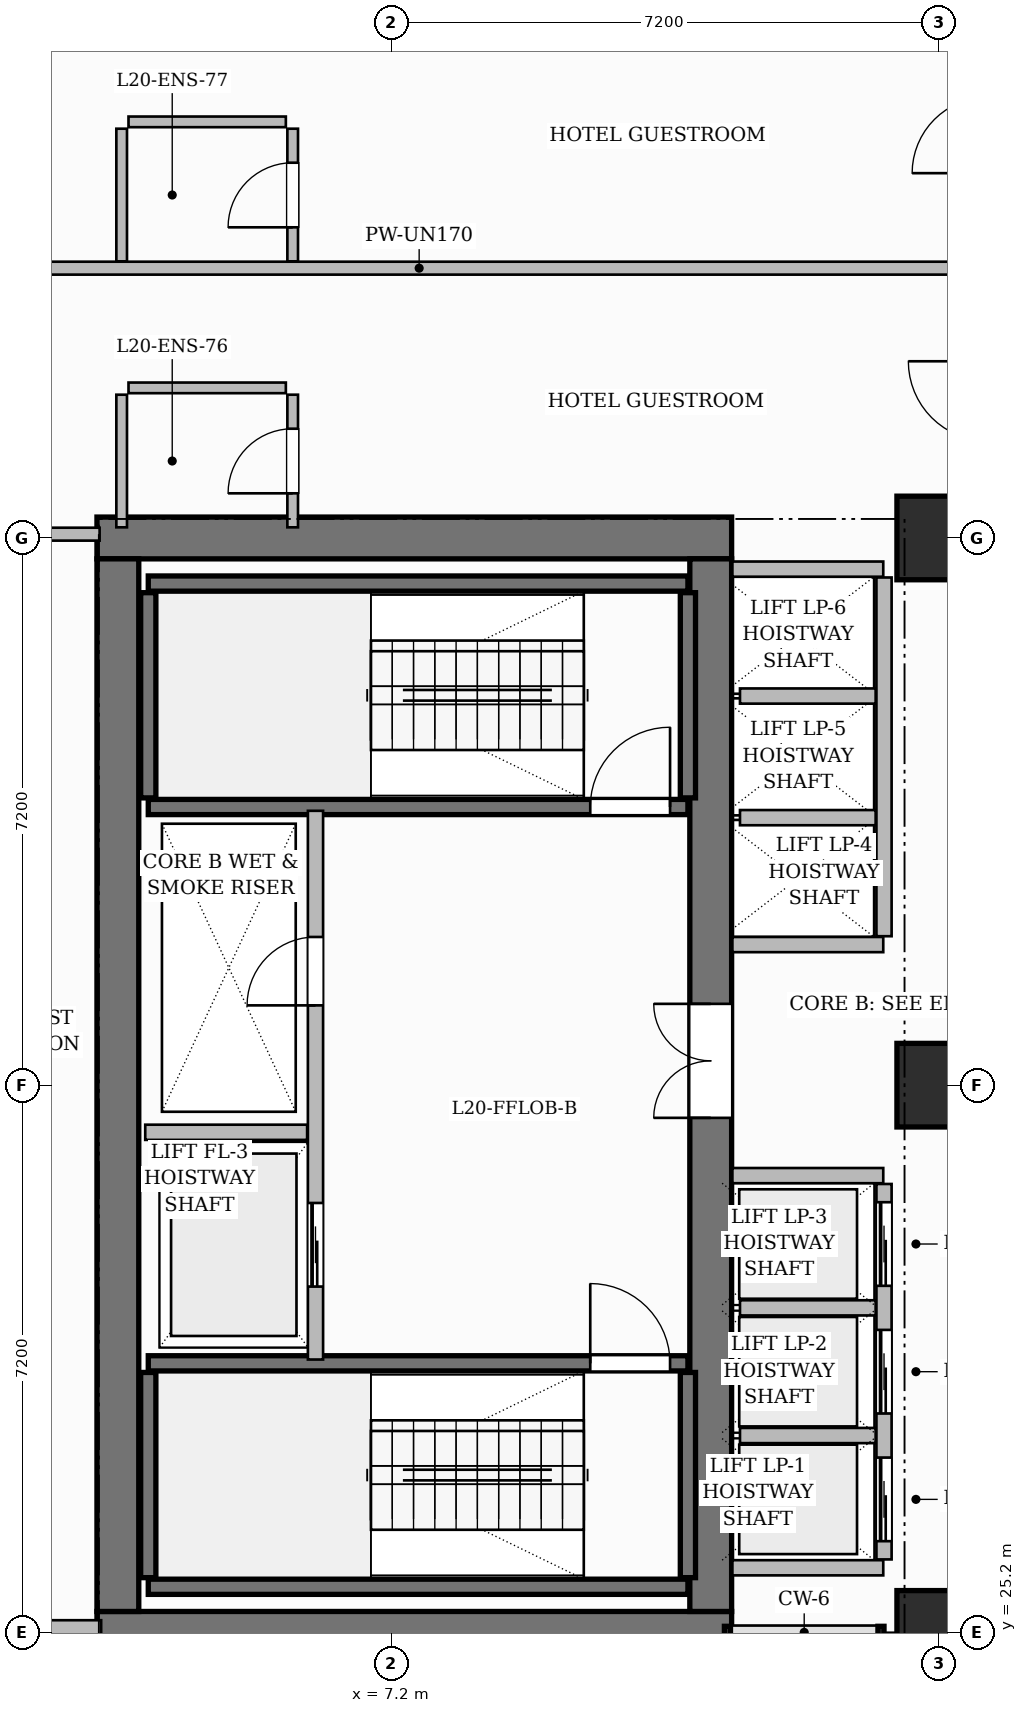
"""IFC4 building model, lengths in metres.
Left out: names, types, materials, properties, quantities, classifications, styles, units other than length and angle.
Written with IfcOpenShell. Run it as: python <this file> out.ifc"""

import sys

from ifc_helpers import new_model, si_unit, direction, frame, frame_2d, origin, origin_2d, place, context, subcontext, project, spatial, rectangle, extrude, source, transform, mapped, element, fill, save


model = new_model("IFC4")
c1 = context("Model", 3, precision=1e-05, world=origin(), true_north=direction((0.0, 1.0)))
c2 = subcontext(c1, "Body", "Model", "MODEL_VIEW")
j1 = project(units=[si_unit("LENGTHUNIT", "METRE"), si_unit("PLANEANGLEUNIT", "RADIAN")], contexts=[c1])
p1 = place(None, origin())
s1 = spatial("IfcSite", under=j1, at=p1, CompositionType="ELEMENT")
p2 = place(p1, origin())
s2 = spatial("IfcBuilding", under=s1, at=p2, CompositionType="ELEMENT")
p3 = place(p2, frame((0.0, 0.0, 84.2)))
s3 = spatial("IfcBuildingStorey", under=s2, at=p3, CompositionType="ELEMENT", Elevation=84.2)
for number, where, z_axis, x_axis in (
    (1, (3.325, 25.2, 0.0), (0.0, 0.0, 1.0), (1.0, 0.0, 0.0)),
    (2, (3.325, 39.6, 0.0), (0.0, 0.0, 1.0), (1.0, 0.0, 0.0)),
):
    element("IfcWall", number, at=place(p3, frame(where, z_axis=z_axis, x_axis=x_axis)), inside=s3, PredefinedType="SHEAR", context=c2, shape_type="SweptSolid", body=[
        extrude(rectangle(XDim=8.35, YDim=0.55, at=frame_2d((4.175, 0.0))), origin(), (0.0, 0.0, 1.0), 3.7),
    ])
p4 = place(p3, frame((3.6, 25.475, 0.0), z_axis=(0.0, 0.0, 1.0), x_axis=(0.0, 1.0, 0.0)))
e3 = element("IfcWall", 3, at=p4, inside=s3, PredefinedType="SHEAR", context=c2, shape_type="SweptSolid", body=[
    extrude(rectangle(XDim=13.85, YDim=0.55, at=frame_2d((6.925, 0.0))), origin(), (0.0, 0.0, 1.0), 3.7),
])
p5 = place(p3, frame((11.4, 25.475, 0.0), z_axis=(0.0, 0.0, 1.0), x_axis=(0.0, 1.0, 0.0)))
e4 = element("IfcWall", 4, at=p5, inside=s3, PredefinedType="SHEAR", context=c2, shape_type="SweptSolid", body=[
    extrude(rectangle(XDim=13.85, YDim=0.55, at=frame_2d((6.925, 0.0))), origin(), (0.0, 0.0, 1.0), 3.7),
])
p6 = place(p5, frame((6.495, 0.0, 0.0)))
e5 = element("IfcOpeningElement", 5, at=p6, cuts=e4, PredefinedType="OPENING", context=c2, shape_type="SweptSolid", body=[
    extrude(rectangle(XDim=1.5, YDim=2.2, at=frame_2d((0.75, 1.1))), frame((0.0, 0.285, 0.0), z_axis=(0.0, -1.0, 0.0), x_axis=(1.0, 0.0, 0.0)), (0.0, 0.0, 1.0), 0.57),
])
m1 = source(origin(), c2, "Body", "SweptSolid", [
    extrude(rectangle(XDim=1.1, YDim=1.1, at=origin_2d()), origin(), (0.0, 0.0, 1.0), 3.7),
])
for number, where, z_axis, x_axis in (
    (6, (14.4, 25.2, 0.0), (0.0, 0.0, 1.0), (1.0, 0.0, 0.0)),
    (7, (14.4, 32.4, 0.0), (0.0, 0.0, 1.0), (1.0, 0.0, 0.0)),
    (8, (14.4, 39.6, 0.0), (0.0, 0.0, 1.0), (1.0, 0.0, 0.0)),
):
    element("IfcColumn", number, at=place(p3, frame(where, z_axis=z_axis, x_axis=x_axis)), inside=s3, PredefinedType="COLUMN", context=c2, shape_type="MappedRepresentation", body=[
        mapped(m1, transform((0.0, 0.0, 0.0), scale=1.0)),
    ])
p7 = place(p3, frame((4.0, 25.8, 0.0), z_axis=(0.0, 0.0, 1.0), x_axis=(1.0, 0.0, 0.0)))
e9 = element("IfcWall", 9, at=p7, inside=s3, PredefinedType="SHEAR", context=c2, shape_type="SweptSolid", body=[
    extrude(rectangle(XDim=7.1, YDim=0.2, at=frame_2d((3.55, 0.0))), origin(), (0.0, 0.0, 1.0), 3.7),
])
for number, where, z_axis, x_axis in (
    (10, (4.0, 25.92, 0.0), (0.0, 0.0, 1.0), (0.0, 1.0, 0.0)),
    (11, (11.1, 25.92, 0.0), (0.0, 0.0, 1.0), (0.0, 1.0, 0.0)),
):
    element("IfcWall", number, at=place(p3, frame(where, z_axis=z_axis, x_axis=x_axis)), inside=s3, PredefinedType="SHEAR", context=c2, shape_type="SweptSolid", body=[
        extrude(rectangle(XDim=2.7, YDim=0.2, at=frame_2d((1.35, 0.0))), origin(), (0.0, 0.0, 1.0), 3.7),
    ])
p8 = place(p3, frame((4.0, 28.74, 0.0), z_axis=(0.0, 0.0, 1.0), x_axis=(1.0, 0.0, 0.0)))
e12 = element("IfcWall", 12, at=p8, inside=s3, PredefinedType="SHEAR", context=c2, shape_type="SweptSolid", body=[
    extrude(rectangle(XDim=7.1, YDim=0.2, at=frame_2d((3.55, 0.0))), origin(), (0.0, 0.0, 1.0), 3.7),
])
p9 = place(p8, frame((5.815, 0.0, 0.0)))
e13 = element("IfcOpeningElement", 13, at=p9, cuts=e12, PredefinedType="OPENING", context=c2, shape_type="SweptSolid", body=[
    extrude(rectangle(XDim=1.05, YDim=2.2, at=frame_2d((0.525, 1.1))), frame((0.0, 0.11, 0.0), z_axis=(0.0, -1.0, 0.0), x_axis=(1.0, 0.0, 0.0)), (0.0, 0.0, 1.0), 0.22),
])
p10 = place(p3, frame((4.0, 39.0, 0.0), z_axis=(0.0, 0.0, 1.0), x_axis=(1.0, 0.0, 0.0)))
e14 = element("IfcWall", 14, at=p10, inside=s3, PredefinedType="SHEAR", context=c2, shape_type="SweptSolid", body=[
    extrude(rectangle(XDim=7.1, YDim=0.2, at=frame_2d((3.55, 0.0))), origin(), (0.0, 0.0, 1.0), 3.7),
])
for number, where, z_axis, x_axis in (
    (15, (4.0, 36.18, 0.0), (0.0, 0.0, 1.0), (0.0, 1.0, 0.0)),
    (16, (11.1, 36.18, 0.0), (0.0, 0.0, 1.0), (0.0, 1.0, 0.0)),
):
    element("IfcWall", number, at=place(p3, frame(where, z_axis=z_axis, x_axis=x_axis)), inside=s3, PredefinedType="SHEAR", context=c2, shape_type="SweptSolid", body=[
        extrude(rectangle(XDim=2.7, YDim=0.2, at=frame_2d((1.35, 0.0))), origin(), (0.0, 0.0, 1.0), 3.7),
    ])
p11 = place(p3, frame((4.0, 36.06, 0.0), z_axis=(0.0, 0.0, 1.0), x_axis=(1.0, 0.0, 0.0)))
e17 = element("IfcWall", 17, at=p11, inside=s3, PredefinedType="SHEAR", context=c2, shape_type="SweptSolid", body=[
    extrude(rectangle(XDim=7.1, YDim=0.2, at=frame_2d((3.55, 0.0))), origin(), (0.0, 0.0, 1.0), 3.7),
])
p12 = place(p11, frame((5.815, 0.0, 0.0)))
e18 = element("IfcOpeningElement", 18, at=p12, cuts=e17, PredefinedType="OPENING", context=c2, shape_type="SweptSolid", body=[
    extrude(rectangle(XDim=1.05, YDim=2.2, at=frame_2d((0.525, 1.1))), frame((0.0, 0.11, 0.0), z_axis=(0.0, -1.0, 0.0), x_axis=(1.0, 0.0, 0.0)), (0.0, 0.0, 1.0), 0.22),
])
p13 = place(p3, frame((6.2, 28.79, 0.0), z_axis=(0.0, 0.0, 1.0), x_axis=(0.0, 1.0, 0.0)))
e19 = element("IfcWall", 19, at=p13, inside=s3, PredefinedType="PARTITIONING", context=c2, shape_type="SweptSolid", body=[
    extrude(rectangle(XDim=7.22, YDim=0.2, at=frame_2d((3.61, 0.0))), origin(), (0.0, 0.0, 1.0), 3.45),
])
p14 = place(p13, frame((4.66, 0.0, 0.0)))
e20 = element("IfcOpeningElement", 20, at=p14, cuts=e19, PredefinedType="OPENING", context=c2, shape_type="SweptSolid", body=[
    extrude(rectangle(XDim=0.9, YDim=2.1, at=frame_2d((0.45, 1.05))), frame((0.0, 0.11, 0.0), z_axis=(0.0, -1.0, 0.0), x_axis=(1.0, 0.0, 0.0)), (0.0, 0.0, 1.0), 0.22),
])
p15 = place(p13, frame((0.96, 0.0, 0.0)))
e21 = element("IfcOpeningElement", 21, at=p15, cuts=e19, PredefinedType="OPENING", context=c2, shape_type="SweptSolid", body=[
    extrude(rectangle(XDim=1.1, YDim=2.2, at=frame_2d((0.55, 1.1))), frame((0.0, 0.11, 0.0), z_axis=(0.0, -1.0, 0.0), x_axis=(1.0, 0.0, 0.0)), (0.0, 0.0, 1.0), 0.22),
])
p16 = place(p3, frame((3.96, 31.78, 0.0), z_axis=(0.0, 0.0, 1.0), x_axis=(1.0, 0.0, 0.0)))
e22 = element("IfcWall", 22, at=p16, inside=s3, PredefinedType="PARTITIONING", context=c2, shape_type="SweptSolid", body=[
    extrude(rectangle(XDim=2.13, YDim=0.2, at=frame_2d((1.065, 0.0))), origin(), (0.0, 0.0, 1.0), 3.45),
])
for number, where, z_axis, x_axis in (
    (23, (11.685, 26.05, 0.0), (0.0, 0.0, 1.0), (1.0, 0.0, 0.0)),
    (24, (11.685, 31.21, 0.0), (0.0, 0.0, 1.0), (1.0, 0.0, 0.0)),
):
    element("IfcWall", number, at=place(p3, frame(where, z_axis=z_axis, x_axis=x_axis)), inside=s3, PredefinedType="PARTITIONING", context=c2, shape_type="SweptSolid", body=[
        extrude(rectangle(XDim=1.985, YDim=0.2, at=frame_2d((0.992, 0.0))), origin(), (0.0, 0.0, 1.0), 3.45),
    ])
p17 = place(p3, frame((13.68, 26.16, 0.0), z_axis=(0.0, 0.0, 1.0), x_axis=(0.0, 1.0, 0.0)))
e25 = element("IfcWall", 25, at=p17, inside=s3, PredefinedType="PARTITIONING", context=c2, shape_type="SweptSolid", body=[
    extrude(rectangle(XDim=4.94, YDim=0.2, at=frame_2d((2.47, 0.0))), origin(), (0.0, 0.0, 1.0), 3.45),
])
p18 = place(p17, frame((0.24, 0.0, 0.0)))
e26 = element("IfcOpeningElement", 26, at=p18, cuts=e25, PredefinedType="OPENING", context=c2, shape_type="SweptSolid", body=[
    extrude(rectangle(XDim=1.1, YDim=2.2, at=frame_2d((0.55, 1.1))), frame((0.0, 0.11, 0.0), z_axis=(0.0, -1.0, 0.0), x_axis=(1.0, 0.0, 0.0)), (0.0, 0.0, 1.0), 0.22),
])
p19 = place(p17, frame((1.92, 0.0, 0.0)))
e27 = element("IfcOpeningElement", 27, at=p19, cuts=e25, PredefinedType="OPENING", context=c2, shape_type="SweptSolid", body=[
    extrude(rectangle(XDim=1.1, YDim=2.2, at=frame_2d((0.55, 1.1))), frame((0.0, 0.11, 0.0), z_axis=(0.0, -1.0, 0.0), x_axis=(1.0, 0.0, 0.0)), (0.0, 0.0, 1.0), 0.22),
])
p20 = place(p17, frame((3.6, 0.0, 0.0)))
e28 = element("IfcOpeningElement", 28, at=p20, cuts=e25, PredefinedType="OPENING", context=c2, shape_type="SweptSolid", body=[
    extrude(rectangle(XDim=1.1, YDim=2.2, at=frame_2d((0.55, 1.1))), frame((0.0, 0.11, 0.0), z_axis=(0.0, -1.0, 0.0), x_axis=(1.0, 0.0, 0.0)), (0.0, 0.0, 1.0), 0.22),
])
for number, where, z_axis, x_axis in (
    (29, (11.785, 27.79, 0.0), (0.0, 0.0, 1.0), (1.0, 0.0, 0.0)),
    (30, (11.785, 29.47, 0.0), (0.0, 0.0, 1.0), (1.0, 0.0, 0.0)),
):
    element("IfcWall", number, at=place(p3, frame(where, z_axis=z_axis, x_axis=x_axis)), inside=s3, PredefinedType="PARTITIONING", context=c2, shape_type="SweptSolid", body=[
        extrude(rectangle(XDim=1.785, YDim=0.2, at=frame_2d((0.893, 0.0))), origin(), (0.0, 0.0, 1.0), 3.45),
    ])
for number, where, z_axis, x_axis in (
    (31, (11.685, 34.25, 0.0), (0.0, 0.0, 1.0), (1.0, 0.0, 0.0)),
    (32, (11.685, 39.19, 0.0), (0.0, 0.0, 1.0), (1.0, 0.0, 0.0)),
):
    element("IfcWall", number, at=place(p3, frame(where, z_axis=z_axis, x_axis=x_axis)), inside=s3, PredefinedType="PARTITIONING", context=c2, shape_type="SweptSolid", body=[
        extrude(rectangle(XDim=1.985, YDim=0.2, at=frame_2d((0.992, 0.0))), origin(), (0.0, 0.0, 1.0), 3.45),
    ])
p21 = place(p3, frame((13.68, 34.36, 0.0), z_axis=(0.0, 0.0, 1.0), x_axis=(0.0, 1.0, 0.0)))
e33 = element("IfcWall", 33, at=p21, inside=s3, PredefinedType="PARTITIONING", context=c2, shape_type="SweptSolid", body=[
    extrude(rectangle(XDim=4.72, YDim=0.2, at=frame_2d((2.36, 0.0))), origin(), (0.0, 0.0, 1.0), 3.45),
])
for number, where, z_axis, x_axis in (
    (34, (11.785, 35.92, 0.0), (0.0, 0.0, 1.0), (1.0, 0.0, 0.0)),
    (35, (11.785, 37.52, 0.0), (0.0, 0.0, 1.0), (1.0, 0.0, 0.0)),
):
    element("IfcWall", number, at=place(p3, frame(where, z_axis=z_axis, x_axis=x_axis)), inside=s3, PredefinedType="PARTITIONING", context=c2, shape_type="SweptSolid", body=[
        extrude(rectangle(XDim=1.785, YDim=0.2, at=frame_2d((0.893, 0.0))), origin(), (0.0, 0.0, 1.0), 3.45),
    ])
p22 = place(p3, frame((0.24, 39.65, 0.0), z_axis=(0.0, 0.0, 1.0), x_axis=(1.0, 0.0, 0.0)))
e36 = element("IfcWall", 36, at=p22, inside=s3, PredefinedType="PARTITIONING", context=c2, shape_type="SweptSolid", body=[
    extrude(rectangle(XDim=3.12, YDim=0.17, at=frame_2d((1.56, 0.0))), origin(), (0.0, 0.0, 1.0), 3.45),
])
p23 = place(p22, frame((1.11, 0.0, 0.0)))
e37 = element("IfcOpeningElement", 37, at=p23, cuts=e36, PredefinedType="OPENING", context=c2, shape_type="SweptSolid", body=[
    extrude(rectangle(XDim=0.9, YDim=2.15, at=frame_2d((0.45, 1.075))), frame((0.0, 0.095, 0.0), z_axis=(0.0, -1.0, 0.0), x_axis=(1.0, 0.0, 0.0)), (0.0, 0.0, 1.0), 0.19),
])
p24 = place(p3, frame((0.168, 43.15, 0.0), z_axis=(0.0, 0.0, 1.0), x_axis=(1.0, 0.0, 0.0)))
e38 = element("IfcWall", 38, at=p24, inside=s3, PredefinedType="PARTITIONING", context=c2, shape_type="SweptSolid", body=[
    extrude(rectangle(XDim=14.792, YDim=0.17, at=frame_2d((7.396, 0.0))), origin(), (0.0, 0.0, 1.0), 3.45),
])
p25 = place(p3, frame((3.65, 39.74, 0.0), z_axis=(0.0, 0.0, 1.0), x_axis=(0.0, 1.0, 0.0)))
e39 = element("IfcWall", 39, at=p25, inside=s3, PredefinedType="PARTITIONING", context=c2, shape_type="SweptSolid", body=[
    extrude(rectangle(XDim=1.745, YDim=0.14, at=frame_2d((0.873, 0.0))), origin(), (0.0, 0.0, 1.0), 3.45),
])
p26 = place(p3, frame((3.74, 41.575, 0.0), z_axis=(0.0, 0.0, 1.0), x_axis=(1.0, 0.0, 0.0)))
e40 = element("IfcWall", 40, at=p26, inside=s3, PredefinedType="PARTITIONING", context=c2, shape_type="SweptSolid", body=[
    extrude(rectangle(XDim=2.07, YDim=0.14, at=frame_2d((1.035, 0.0))), origin(), (0.0, 0.0, 1.0), 2.885),
])
p27 = place(p3, frame((5.9, 39.74, 0.0), z_axis=(0.0, 0.0, 1.0), x_axis=(0.0, 1.0, 0.0)))
e41 = element("IfcWall", 41, at=p27, inside=s3, PredefinedType="PARTITIONING", context=c2, shape_type="SweptSolid", body=[
    extrude(rectangle(XDim=1.745, YDim=0.14, at=frame_2d((0.873, 0.0))), origin(), (0.0, 0.0, 1.0), 3.45),
])
p28 = place(p27, frame((0.448, 0.0, 0.0)))
e42 = element("IfcOpeningElement", 42, at=p28, cuts=e41, PredefinedType="OPENING", context=c2, shape_type="SweptSolid", body=[
    extrude(rectangle(XDim=0.85, YDim=2.1, at=frame_2d((0.425, 1.05))), frame((0.0, 0.08, 0.0), z_axis=(0.0, -1.0, 0.0), x_axis=(1.0, 0.0, 0.0)), (0.0, 0.0, 1.0), 0.16),
])
p29 = place(p3, frame((3.65, 43.24, 0.0), z_axis=(0.0, 0.0, 1.0), x_axis=(0.0, 1.0, 0.0)))
e43 = element("IfcWall", 43, at=p29, inside=s3, PredefinedType="PARTITIONING", context=c2, shape_type="SweptSolid", body=[
    extrude(rectangle(XDim=1.745, YDim=0.14, at=frame_2d((0.873, 0.0))), origin(), (0.0, 0.0, 1.0), 3.45),
])
p30 = place(p3, frame((3.74, 45.075, 0.0), z_axis=(0.0, 0.0, 1.0), x_axis=(1.0, 0.0, 0.0)))
e44 = element("IfcWall", 44, at=p30, inside=s3, PredefinedType="PARTITIONING", context=c2, shape_type="SweptSolid", body=[
    extrude(rectangle(XDim=2.07, YDim=0.14, at=frame_2d((1.035, 0.0))), origin(), (0.0, 0.0, 1.0), 3.45),
])
p31 = place(p3, frame((5.9, 43.24, 0.0), z_axis=(0.0, 0.0, 1.0), x_axis=(0.0, 1.0, 0.0)))
e45 = element("IfcWall", 45, at=p31, inside=s3, PredefinedType="PARTITIONING", context=c2, shape_type="SweptSolid", body=[
    extrude(rectangle(XDim=1.745, YDim=0.14, at=frame_2d((0.873, 0.0))), origin(), (0.0, 0.0, 1.0), 3.45),
])
p32 = place(p31, frame((0.448, 0.0, 0.0)))
e46 = element("IfcOpeningElement", 46, at=p32, cuts=e45, PredefinedType="OPENING", context=c2, shape_type="SweptSolid", body=[
    extrude(rectangle(XDim=0.85, YDim=2.1, at=frame_2d((0.425, 1.05))), frame((0.0, 0.08, 0.0), z_axis=(0.0, -1.0, 0.0), x_axis=(1.0, 0.0, 0.0)), (0.0, 0.0, 1.0), 0.16),
])
p33 = place(p3, frame((0.0, 25.2, 0.0), z_axis=(0.0, 0.0, 1.0), x_axis=(1.0, 0.0, 0.0)))
e47 = element("IfcWall", 47, at=p33, inside=s3, PredefinedType="SOLIDWALL", context=c2, shape_type="SweptSolid", body=[
    extrude(rectangle(XDim=3.38, YDim=0.32, at=frame_2d((1.69, 0.0))), origin(), (0.0, 0.0, 1.0), 3.45),
])
p34 = place(p33, frame((1.205, 0.0, 0.8)))
e48 = element("IfcOpeningElement", 48, at=p34, cuts=e47, PredefinedType="OPENING", context=c2, shape_type="SweptSolid", body=[
    extrude(rectangle(XDim=1.4, YDim=1.85, at=frame_2d((0.7, 0.925))), frame((0.0, 0.17, 0.0), z_axis=(0.0, -1.0, 0.0), x_axis=(1.0, 0.0, 0.0)), (0.0, 0.0, 1.0), 0.34),
])
m2 = source(origin(), c2, "Body", "SweptSolid", [
    extrude(rectangle(XDim=1.05, YDim=2.2, at=frame_2d((0.525, 1.1))), frame((0.0, 0.025, 0.0), z_axis=(0.0, -1.0, 0.0), x_axis=(1.0, 0.0, 0.0)), (0.0, 0.0, 1.0), 0.05),
])
p35 = place(p9, origin())
e49 = element("IfcDoor", 49, at=p35, inside=s3, OperationType="SINGLE_SWING_LEFT", PredefinedType="DOOR", context=c2, shape_type="MappedRepresentation", body=[
    mapped(m2, transform((0.0, 0.0, 0.0), scale=1.0)),
])
fill(e13, e49)
p36 = place(p12, origin())
e50 = element("IfcDoor", 50, at=p36, inside=s3, OperationType="SINGLE_SWING_RIGHT", PredefinedType="DOOR", context=c2, shape_type="MappedRepresentation", body=[
    mapped(m2, transform((0.0, 0.0, 0.0), scale=1.0)),
])
fill(e18, e50)
m3 = source(origin(), c2, "Body", "SweptSolid", [
    extrude(rectangle(XDim=0.9, YDim=2.1, at=frame_2d((0.45, 1.05))), frame((0.0, 0.025, 0.0), z_axis=(0.0, -1.0, 0.0), x_axis=(1.0, 0.0, 0.0)), (0.0, 0.0, 1.0), 0.05),
])
p37 = place(p14, origin())
e51 = element("IfcDoor", 51, at=p37, inside=s3, OperationType="SINGLE_SWING_LEFT", PredefinedType="DOOR", context=c2, shape_type="MappedRepresentation", body=[
    mapped(m3, transform((0.0, 0.0, 0.0), scale=1.0)),
])
fill(e20, e51)
m4 = source(origin(), c2, "Body", "SweptSolid", [
    extrude(rectangle(XDim=1.5, YDim=2.2, at=frame_2d((0.75, 1.1))), frame((0.0, 0.025, 0.0), z_axis=(0.0, -1.0, 0.0), x_axis=(1.0, 0.0, 0.0)), (0.0, 0.0, 1.0), 0.05),
])
p38 = place(p6, origin())
e52 = element("IfcDoor", 52, at=p38, inside=s3, OperationType="DOUBLE_DOOR_SINGLE_SWING", PredefinedType="DOOR", context=c2, shape_type="MappedRepresentation", body=[
    mapped(m4, transform((0.0, 0.0, 0.0), scale=1.0)),
])
fill(e5, e52)
m5 = source(origin(), c2, "Body", "SweptSolid", [
    extrude(rectangle(XDim=0.85, YDim=2.1, at=frame_2d((0.425, 1.05))), frame((0.0, 0.025, 0.0), z_axis=(0.0, -1.0, 0.0), x_axis=(1.0, 0.0, 0.0)), (0.0, 0.0, 1.0), 0.05),
])
p39 = place(p28, origin())
e53 = element("IfcDoor", 53, at=p39, inside=s3, OperationType="SINGLE_SWING_LEFT", PredefinedType="DOOR", context=c2, shape_type="MappedRepresentation", body=[
    mapped(m5, transform((0.0, 0.0, 0.0), scale=1.0)),
])
fill(e42, e53)
p40 = place(p32, origin())
e54 = element("IfcDoor", 54, at=p40, inside=s3, OperationType="SINGLE_SWING_LEFT", PredefinedType="DOOR", context=c2, shape_type="MappedRepresentation", body=[
    mapped(m5, transform((0.0, 0.0, 0.0), scale=1.0)),
])
fill(e46, e54)
m6 = source(origin(), c2, "Body", "SweptSolid", [
    extrude(rectangle(XDim=1.1, YDim=2.2, at=frame_2d((0.55, 1.1))), frame((0.0, 0.025, 0.0), z_axis=(0.0, -1.0, 0.0), x_axis=(1.0, 0.0, 0.0)), (0.0, 0.0, 1.0), 0.05),
])
p41 = place(p15, origin())
e55 = element("IfcDoor", 55, at=p41, inside=s3, OperationType="SLIDING_TO_LEFT", PredefinedType="DOOR", context=c2, shape_type="MappedRepresentation", body=[
    mapped(m6, transform((0.0, 0.0, 0.0), scale=1.0)),
])
fill(e21, e55)
p42 = place(p18, origin())
e56 = element("IfcDoor", 56, at=p42, inside=s3, OperationType="SLIDING_TO_LEFT", PredefinedType="DOOR", context=c2, shape_type="MappedRepresentation", body=[
    mapped(m6, transform((0.0, 0.0, 0.0), scale=1.0)),
])
fill(e26, e56)
p43 = place(p19, origin())
e57 = element("IfcDoor", 57, at=p43, inside=s3, OperationType="SLIDING_TO_LEFT", PredefinedType="DOOR", context=c2, shape_type="MappedRepresentation", body=[
    mapped(m6, transform((0.0, 0.0, 0.0), scale=1.0)),
])
fill(e27, e57)
p44 = place(p20, origin())
e58 = element("IfcDoor", 58, at=p44, inside=s3, OperationType="SLIDING_TO_LEFT", PredefinedType="DOOR", context=c2, shape_type="MappedRepresentation", body=[
    mapped(m6, transform((0.0, 0.0, 0.0), scale=1.0)),
])
fill(e28, e58)
save(model, sys.argv[1])
